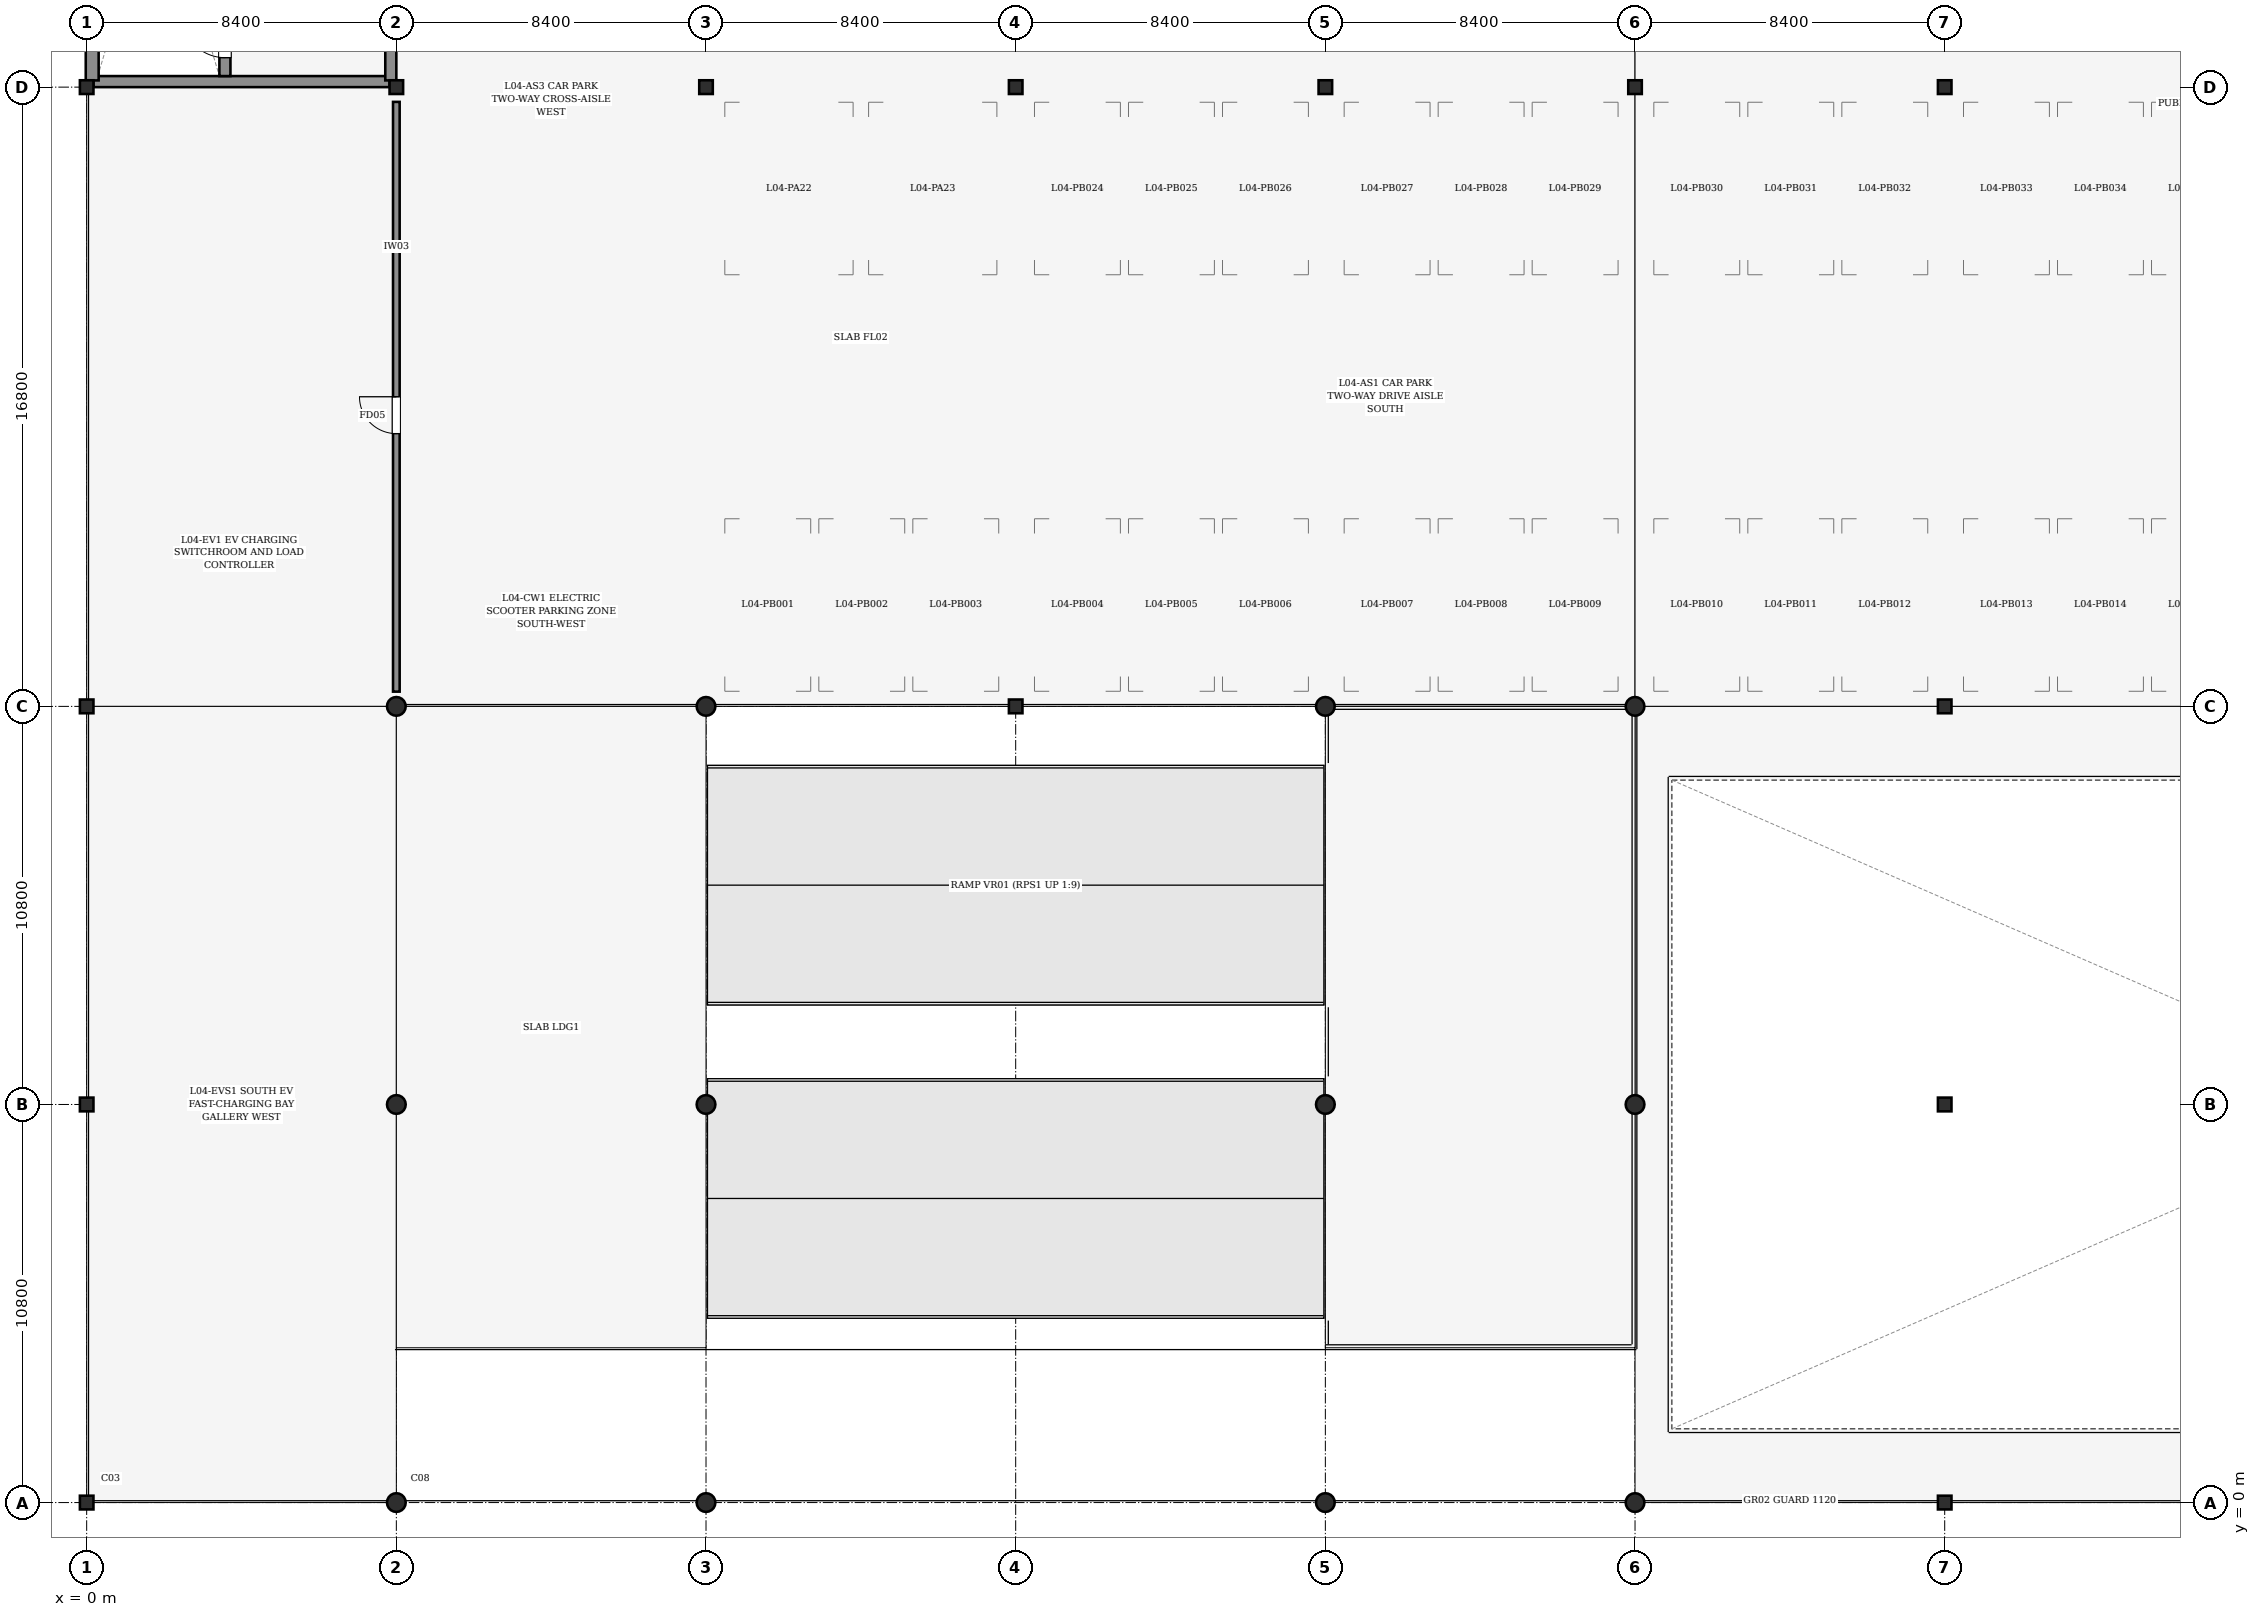
"""IFC4 building model, lengths in metres.
Left out: names, types, materials, properties, quantities, classifications, styles, units other than length and angle.
Written with IfcOpenShell. Run it as: python <this file> out.ifc"""

import sys

from ifc_helpers import new_model, si_unit, direction, frame, frame_2d, origin, origin_2d, place, context, subcontext, project, spatial, rectangle, hollow_circle, i_section, extrude, element, fill, save


model = new_model("IFC4")
c1 = context("Model", 3, precision=1e-05, world=origin(), true_north=direction((0.0, 1.0)))
c2 = subcontext(c1, "Body", "Model", "MODEL_VIEW")
j1 = project(units=[si_unit("LENGTHUNIT", "METRE"), si_unit("PLANEANGLEUNIT", "RADIAN")], contexts=[c1])
p1 = place(None, origin())
s1 = spatial("IfcSite", under=j1, at=p1, CompositionType="ELEMENT")
p2 = place(p1, origin())
s2 = spatial("IfcBuilding", under=s1, at=p2, CompositionType="ELEMENT")
p3 = place(p2, frame((0.0, 0.0, 16.2)))
s3 = spatial("IfcBuildingStorey", under=s2, at=p3, CompositionType="ELEMENT", Elevation=16.2)
for number, where, z_axis, x_axis in (
    (1, (0.0, 0.0, 0.0), (0.0, 0.0, 1.0), (1.0, 0.0, 0.0)),
    (2, (0.0, 10.8, 0.0), (0.0, 0.0, 1.0), (1.0, 0.0, 0.0)),
    (3, (0.0, 21.6, 0.0), (0.0, 0.0, 1.0), (1.0, 0.0, 0.0)),
    (4, (0.0, 38.4, 0.0), (0.0, 0.0, 1.0), (1.0, 0.0, 0.0)),
):
    element("IfcColumn", number, at=place(p3, frame(where, z_axis=z_axis, x_axis=x_axis)), inside=s3, PredefinedType="COLUMN", context=c2, shape_type="SweptSolid", body=[
        extrude(i_section(OverallWidth=0.373, OverallDepth=0.368, WebThickness=0.014, FlangeThickness=0.024, FilletRadius=0.015, at=origin_2d()), origin(), (0.0, 0.0, 1.0), 3.6),
    ])
for number, where, z_axis, x_axis in (
    (5, (8.4, 0.0, 0.0), (0.0, 0.0, 1.0), (1.0, 0.0, 0.0)),
    (6, (8.4, 10.8, 0.0), (0.0, 0.0, 1.0), (1.0, 0.0, 0.0)),
    (7, (8.4, 21.6, 0.0), (0.0, 0.0, 1.0), (1.0, 0.0, 0.0)),
):
    element("IfcColumn", number, at=place(p3, frame(where, z_axis=z_axis, x_axis=x_axis)), inside=s3, PredefinedType="COLUMN", context=c2, shape_type="SweptSolid", body=[
        extrude(hollow_circle(Radius=0.254, WallThickness=0.016, at=origin_2d()), origin(), (0.0, 0.0, 1.0), 3.6),
    ])
p4 = place(p3, frame((8.4, 38.4, 0.0), z_axis=(0.0, 0.0, 1.0), x_axis=(1.0, 0.0, 0.0)))
e8 = element("IfcColumn", 8, at=p4, inside=s3, PredefinedType="COLUMN", context=c2, shape_type="SweptSolid", body=[
    extrude(i_section(OverallWidth=0.373, OverallDepth=0.368, WebThickness=0.014, FlangeThickness=0.024, FilletRadius=0.015, at=origin_2d()), origin(), (0.0, 0.0, 1.0), 3.6),
])
for number, where, z_axis, x_axis in (
    (9, (16.8, 0.0, 0.0), (0.0, 0.0, 1.0), (1.0, 0.0, 0.0)),
    (10, (16.8, 10.8, 0.0), (0.0, 0.0, 1.0), (1.0, 0.0, 0.0)),
    (11, (16.8, 21.6, 0.0), (0.0, 0.0, 1.0), (1.0, 0.0, 0.0)),
):
    element("IfcColumn", number, at=place(p3, frame(where, z_axis=z_axis, x_axis=x_axis)), inside=s3, PredefinedType="COLUMN", context=c2, shape_type="SweptSolid", body=[
        extrude(hollow_circle(Radius=0.254, WallThickness=0.016, at=origin_2d()), origin(), (0.0, 0.0, 1.0), 3.6),
    ])
for number, where, z_axis, x_axis in (
    (12, (16.8, 38.4, 0.0), (0.0, 0.0, 1.0), (1.0, 0.0, 0.0)),
    (13, (25.2, 21.6, 0.0), (0.0, 0.0, 1.0), (1.0, 0.0, 0.0)),
    (14, (25.2, 38.4, 0.0), (0.0, 0.0, 1.0), (1.0, 0.0, 0.0)),
):
    element("IfcColumn", number, at=place(p3, frame(where, z_axis=z_axis, x_axis=x_axis)), inside=s3, PredefinedType="COLUMN", context=c2, shape_type="SweptSolid", body=[
        extrude(i_section(OverallWidth=0.373, OverallDepth=0.368, WebThickness=0.014, FlangeThickness=0.024, FilletRadius=0.015, at=origin_2d()), origin(), (0.0, 0.0, 1.0), 3.6),
    ])
for number, where, z_axis, x_axis in (
    (15, (33.6, 0.0, 0.0), (0.0, 0.0, 1.0), (1.0, 0.0, 0.0)),
    (16, (33.6, 10.8, 0.0), (0.0, 0.0, 1.0), (1.0, 0.0, 0.0)),
    (17, (33.6, 21.6, 0.0), (0.0, 0.0, 1.0), (1.0, 0.0, 0.0)),
):
    element("IfcColumn", number, at=place(p3, frame(where, z_axis=z_axis, x_axis=x_axis)), inside=s3, PredefinedType="COLUMN", context=c2, shape_type="SweptSolid", body=[
        extrude(hollow_circle(Radius=0.254, WallThickness=0.016, at=origin_2d()), origin(), (0.0, 0.0, 1.0), 3.6),
    ])
p5 = place(p3, frame((33.6, 38.4, 0.0), z_axis=(0.0, 0.0, 1.0), x_axis=(1.0, 0.0, 0.0)))
e18 = element("IfcColumn", 18, at=p5, inside=s3, PredefinedType="COLUMN", context=c2, shape_type="SweptSolid", body=[
    extrude(i_section(OverallWidth=0.373, OverallDepth=0.368, WebThickness=0.014, FlangeThickness=0.024, FilletRadius=0.015, at=origin_2d()), origin(), (0.0, 0.0, 1.0), 3.6),
])
for number, where, z_axis, x_axis in (
    (19, (42.0, 0.0, 0.0), (0.0, 0.0, 1.0), (1.0, 0.0, 0.0)),
    (20, (42.0, 10.8, 0.0), (0.0, 0.0, 1.0), (1.0, 0.0, 0.0)),
    (21, (42.0, 21.6, 0.0), (0.0, 0.0, 1.0), (1.0, 0.0, 0.0)),
):
    element("IfcColumn", number, at=place(p3, frame(where, z_axis=z_axis, x_axis=x_axis)), inside=s3, PredefinedType="COLUMN", context=c2, shape_type="SweptSolid", body=[
        extrude(hollow_circle(Radius=0.254, WallThickness=0.016, at=origin_2d()), origin(), (0.0, 0.0, 1.0), 3.6),
    ])
for number, where, z_axis, x_axis in (
    (22, (42.0, 38.4, 0.0), (0.0, 0.0, 1.0), (1.0, 0.0, 0.0)),
    (23, (50.4, 0.0, 0.0), (0.0, 0.0, 1.0), (1.0, 0.0, 0.0)),
    (24, (50.4, 10.8, 0.0), (0.0, 0.0, 1.0), (1.0, 0.0, 0.0)),
    (25, (50.4, 21.6, 0.0), (0.0, 0.0, 1.0), (1.0, 0.0, 0.0)),
    (26, (50.4, 38.4, 0.0), (0.0, 0.0, 1.0), (1.0, 0.0, 0.0)),
):
    element("IfcColumn", number, at=place(p3, frame(where, z_axis=z_axis, x_axis=x_axis)), inside=s3, PredefinedType="COLUMN", context=c2, shape_type="SweptSolid", body=[
        extrude(i_section(OverallWidth=0.373, OverallDepth=0.368, WebThickness=0.014, FlangeThickness=0.024, FilletRadius=0.015, at=origin_2d()), origin(), (0.0, 0.0, 1.0), 3.6),
    ])
p6 = place(p3, frame((0.185, 38.55, 0.0), z_axis=(0.0, 0.0, 1.0), x_axis=(1.0, 0.0, 0.0)))
e27 = element("IfcWall", 27, at=p6, inside=s3, PredefinedType="SHEAR", context=c2, shape_type="SweptSolid", body=[
    extrude(rectangle(XDim=8.031, YDim=0.3, at=frame_2d((4.016, 0.0))), origin(), (0.0, 0.0, 1.0), 3.38),
])
p7 = place(p3, frame((0.15, 38.582, 0.0), z_axis=(0.0, 0.0, 1.0), x_axis=(0.0, 1.0, 0.0)))
e28 = element("IfcWall", 28, at=p7, inside=s3, PredefinedType="SHEAR", context=c2, shape_type="SweptSolid", body=[
    extrude(rectangle(XDim=16.436, YDim=0.35, at=frame_2d((8.218, 0.0))), origin(), (0.0, 0.0, 1.0), 3.38),
])
p8 = place(p3, frame((8.25, 38.582, 0.0), z_axis=(0.0, 0.0, 1.0), x_axis=(0.0, 1.0, 0.0)))
e29 = element("IfcWall", 29, at=p8, inside=s3, PredefinedType="SHEAR", context=c2, shape_type="SweptSolid", body=[
    extrude(rectangle(XDim=16.436, YDim=0.3, at=frame_2d((8.218, 0.0))), origin(), (0.0, 0.0, 1.0), 3.38),
])
p9 = place(p8, frame((5.668, 0.0, 0.0)))
e30 = element("IfcOpeningElement", 30, at=p9, cuts=e29, PredefinedType="OPENING", context=c2, shape_type="SweptSolid", body=[
    extrude(rectangle(XDim=1.3, YDim=2.2, at=frame_2d((0.65, 1.1))), frame((0.0, 0.16, 0.0), z_axis=(0.0, -1.0, 0.0), x_axis=(1.0, 0.0, 0.0)), (0.0, 0.0, 1.0), 0.32),
])
p10 = place(p3, frame((3.75, 38.7, 0.0), z_axis=(0.0, 0.0, 1.0), x_axis=(0.0, 1.0, 0.0)))
e31 = element("IfcWall", 31, at=p10, inside=s3, PredefinedType="SHEAR", context=c2, shape_type="SweptSolid", body=[
    extrude(rectangle(XDim=16.2, YDim=0.3, at=frame_2d((8.1, 0.0))), origin(), (0.0, 0.0, 1.0), 3.38),
])
p11 = place(p10, frame((0.5, 0.0, 0.0)))
e32 = element("IfcOpeningElement", 32, at=p11, cuts=e31, PredefinedType="OPENING", context=c2, shape_type="SweptSolid", body=[
    extrude(rectangle(XDim=1.15, YDim=2.15, at=frame_2d((0.575, 1.075))), frame((0.0, 0.16, 0.0), z_axis=(0.0, -1.0, 0.0), x_axis=(1.0, 0.0, 0.0)), (0.0, 0.0, 1.0), 0.32),
])
p12 = place(p3, frame((8.4, 22.0, 0.0), z_axis=(0.0, 0.0, 1.0), x_axis=(0.0, 1.0, 0.0)))
e33 = element("IfcWall", 33, at=p12, inside=s3, PredefinedType="PARTITIONING", context=c2, shape_type="SweptSolid", body=[
    extrude(rectangle(XDim=16.0, YDim=0.18, at=frame_2d((8.0, 0.0))), origin(), (0.0, 0.0, 1.0), 2.525),
])
p13 = place(p12, frame((7.0, 0.0, 0.0)))
e34 = element("IfcOpeningElement", 34, at=p13, cuts=e33, PredefinedType="OPENING", context=c2, shape_type="SweptSolid", body=[
    extrude(rectangle(XDim=1.0, YDim=2.15, at=frame_2d((0.5, 1.075))), frame((0.0, 0.1, 0.0), z_axis=(0.0, -1.0, 0.0), x_axis=(1.0, 0.0, 0.0)), (0.0, 0.0, 1.0), 0.2),
])
p14 = place(p11, frame((1.15, 0.0, 0.0), z_axis=(0.0, 0.0, 1.0), x_axis=(-1.0, 0.0, 0.0)))
e35 = element("IfcDoor", 35, at=p14, inside=s3, OperationType="SINGLE_SWING_LEFT", PredefinedType="DOOR", context=c2, shape_type="SweptSolid", body=[
    extrude(rectangle(XDim=1.15, YDim=2.15, at=frame_2d((0.575, 1.075))), frame((0.0, 0.025, 0.0), z_axis=(0.0, -1.0, 0.0), x_axis=(1.0, 0.0, 0.0)), (0.0, 0.0, 1.0), 0.05),
])
fill(e32, e35)
p15 = place(p13, origin())
e36 = element("IfcDoor", 36, at=p15, inside=s3, OperationType="SINGLE_SWING_RIGHT", PredefinedType="DOOR", context=c2, shape_type="SweptSolid", body=[
    extrude(rectangle(XDim=1.0, YDim=2.15, at=frame_2d((0.5, 1.075))), frame((0.0, 0.025, 0.0), z_axis=(0.0, -1.0, 0.0), x_axis=(1.0, 0.0, 0.0)), (0.0, 0.0, 1.0), 0.05),
])
fill(e34, e36)
save(model, sys.argv[1])
